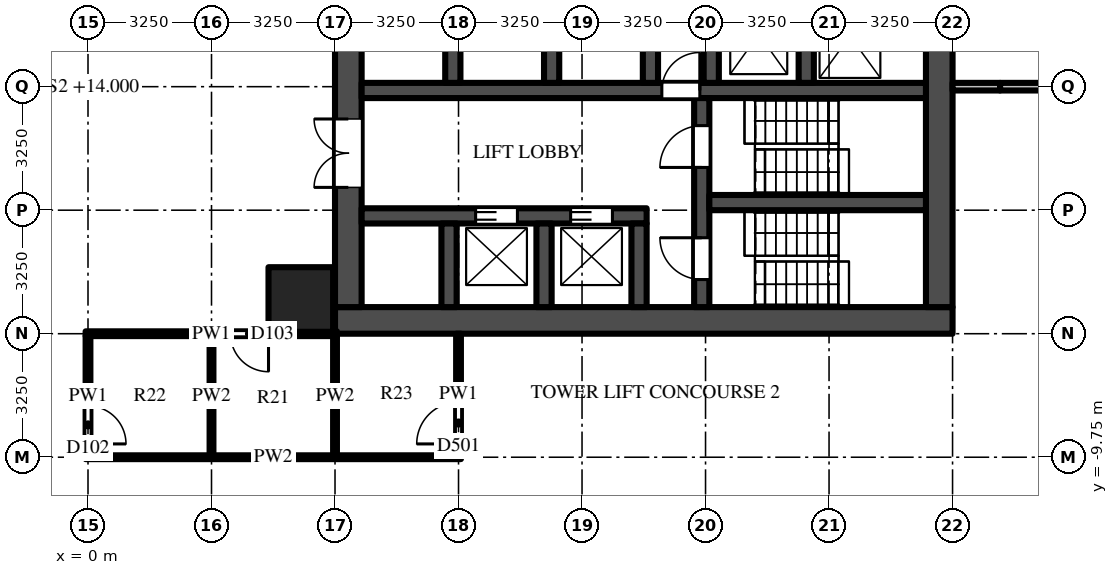
"""IFC4 building model, lengths in metres.
Left out: names, types, materials, properties, quantities, classifications, styles, units other than length and angle.
Written with IfcOpenShell. Run it as: python <this file> out.ifc"""

import sys

from ifc_helpers import new_model, si_unit, direction, frame, frame_2d, origin, origin_2d, place, context, subcontext, project, spatial, rectangle, extrude, source, transform, mapped, element, fill, save


model = new_model("IFC4")
c1 = context("Model", 3, precision=1e-05, world=origin(), true_north=direction((0.0, 1.0)))
c2 = subcontext(c1, "Body", "Model", "MODEL_VIEW")
j1 = project(units=[si_unit("LENGTHUNIT", "METRE"), si_unit("PLANEANGLEUNIT", "RADIAN")], contexts=[c1])
p1 = place(None, origin())
s1 = spatial("IfcSite", under=j1, at=p1, CompositionType="ELEMENT")
p2 = place(p1, origin())
s2 = spatial("IfcBuilding", under=s1, at=p2, CompositionType="ELEMENT")
p3 = place(p2, frame((0.0, 0.0, 14.0)))
s3 = spatial("IfcBuildingStorey", under=s2, at=p3, CompositionType="ELEMENT", Elevation=14.0)
m1 = source(origin(), c2, "Body", "SweptSolid", [
    extrude(rectangle(XDim=1.7, YDim=1.7, at=origin_2d()), origin(), (0.0, 0.0, 1.0), 5.0),
])
p4 = place(p3, frame((5.6, -5.6, 0.0), z_axis=(0.0, 0.0, 1.0), x_axis=(1.0, 0.0, 0.0)))
e1 = element("IfcColumn", 1, at=p4, inside=s3, PredefinedType="COLUMN", context=c2, shape_type="MappedRepresentation", body=[
    mapped(m1, transform((0.0, 0.0, 0.0))),
])
m2 = source(origin(), c2, "Body", "SweptSolid", [
    extrude(rectangle(XDim=16.25, YDim=0.7, at=frame_2d((8.125, 0.0))), origin(), (0.0, 0.0, 1.0), 4.7),
])
p5 = place(p3, frame((6.5, -6.15, 0.0), z_axis=(0.0, 0.0, 1.0), x_axis=(1.0, 0.0, 0.0)))
e2 = element("IfcWall", 2, at=p5, inside=s3, PredefinedType="SHEAR", context=c2, shape_type="MappedRepresentation", body=[
    mapped(m2, transform((0.0, 0.0, 0.0))),
])
m3 = source(origin(), c2, "Body", "SweptSolid", [
    extrude(rectangle(XDim=9.05, YDim=0.7, at=frame_2d((4.525, 0.0))), origin(), (0.0, 0.0, 1.0), 4.7),
])
p6 = place(p3, frame((6.85, -5.8, 0.0), z_axis=(0.0, 0.0, 1.0), x_axis=(0.0, 1.0, 0.0)))
e3 = element("IfcWall", 3, at=p6, inside=s3, PredefinedType="SHEAR", context=c2, shape_type="MappedRepresentation", body=[
    mapped(m3, transform((0.0, 0.0, 0.0))),
])
m4 = source(origin(), c2, "Body", "SweptSolid", [
    extrude(rectangle(XDim=1.8, YDim=2.1, at=frame_2d((0.9, 1.05))), frame((0.0, 0.36, 0.0), z_axis=(0.0, -1.0, 0.0), x_axis=(1.0, 0.0, 0.0)), (0.0, 0.0, 1.0), 0.72),
])
p7 = place(p6, frame((3.15, 0.0, 0.0)))
e4 = element("IfcOpeningElement", 4, at=p7, cuts=e3, PredefinedType="OPENING", context=c2, shape_type="MappedRepresentation", body=[
    mapped(m4, transform((0.0, 0.0, 0.0))),
])
p8 = place(p3, frame((22.4, -5.8, 0.0), z_axis=(0.0, 0.0, 1.0), x_axis=(0.0, 1.0, 0.0)))
e5 = element("IfcWall", 5, at=p8, inside=s3, PredefinedType="SHEAR", context=c2, shape_type="MappedRepresentation", body=[
    mapped(m3, transform((0.0, 0.0, 0.0))),
])
m5 = source(origin(), c2, "Body", "SweptSolid", [
    extrude(rectangle(XDim=7.5, YDim=0.4, at=frame_2d((3.75, 0.0))), origin(), (0.0, 0.0, 1.0), 4.7),
])
p9 = place(p3, frame((7.2, -3.4, 0.0), z_axis=(0.0, 0.0, 1.0), x_axis=(1.0, 0.0, 0.0)))
e6 = element("IfcWall", 6, at=p9, inside=s3, PredefinedType="SHEAR", context=c2, shape_type="MappedRepresentation", body=[
    mapped(m5, transform((0.0, 0.0, 0.0))),
])
m6 = source(origin(), c2, "Body", "SweptSolid", [
    extrude(rectangle(XDim=1.1, YDim=2.1, at=frame_2d((0.55, 1.05))), frame((0.0, 0.21, 0.0), z_axis=(0.0, -1.0, 0.0), x_axis=(1.0, 0.0, 0.0)), (0.0, 0.0, 1.0), 0.42),
])
p10 = place(p9, frame((3.0, 0.0, 0.0)))
e7 = element("IfcOpeningElement", 7, at=p10, cuts=e6, PredefinedType="OPENING", context=c2, shape_type="MappedRepresentation", body=[
    mapped(m6, transform((0.0, 0.0, 0.0))),
])
p11 = place(p9, frame((5.5, 0.0, 0.0)))
e8 = element("IfcOpeningElement", 8, at=p11, cuts=e6, PredefinedType="OPENING", context=c2, shape_type="MappedRepresentation", body=[
    mapped(m6, transform((0.0, 0.0, 0.0))),
])
m7 = source(origin(), c2, "Body", "SweptSolid", [
    extrude(rectangle(XDim=14.85, YDim=0.4, at=frame_2d((7.425, 0.0))), origin(), (0.0, 0.0, 1.0), 4.7),
])
p12 = place(p3, frame((7.2, -0.1, 0.0), z_axis=(0.0, 0.0, 1.0), x_axis=(1.0, 0.0, 0.0)))
e9 = element("IfcWall", 9, at=p12, inside=s3, PredefinedType="SHEAR", context=c2, shape_type="MappedRepresentation", body=[
    mapped(m7, transform((0.0, 0.0, 0.0))),
])
m8 = source(origin(), c2, "Body", "SweptSolid", [
    extrude(rectangle(XDim=1.0, YDim=2.1, at=frame_2d((0.5, 1.05))), frame((0.0, 0.21, 0.0), z_axis=(0.0, -1.0, 0.0), x_axis=(1.0, 0.0, 0.0)), (0.0, 0.0, 1.0), 0.42),
])
p13 = place(p12, frame((7.9, 0.0, 0.0)))
e10 = element("IfcOpeningElement", 10, at=p13, cuts=e9, PredefinedType="OPENING", context=c2, shape_type="MappedRepresentation", body=[
    mapped(m8, transform((0.0, 0.0, 0.0))),
])
m9 = source(origin(), c2, "Body", "SweptSolid", [
    extrude(rectangle(XDim=5.5, YDim=0.4, at=frame_2d((2.75, 0.0))), origin(), (0.0, 0.0, 1.0), 4.7),
])
p14 = place(p3, frame((16.15, -5.8, 0.0), z_axis=(0.0, 0.0, 1.0), x_axis=(0.0, 1.0, 0.0)))
e11 = element("IfcWall", 11, at=p14, inside=s3, PredefinedType="SHEAR", context=c2, shape_type="MappedRepresentation", body=[
    mapped(m9, transform((0.0, 0.0, 0.0))),
])
p15 = place(p14, frame((0.725, 0.0, 0.0)))
e12 = element("IfcOpeningElement", 12, at=p15, cuts=e11, PredefinedType="OPENING", context=c2, shape_type="MappedRepresentation", body=[
    mapped(m6, transform((0.0, 0.0, 0.0))),
])
p16 = place(p14, frame((3.675, 0.0, 0.0)))
e13 = element("IfcOpeningElement", 13, at=p16, cuts=e11, PredefinedType="OPENING", context=c2, shape_type="MappedRepresentation", body=[
    mapped(m6, transform((0.0, 0.0, 0.0))),
])
m10 = source(origin(), c2, "Body", "SweptSolid", [
    extrude(rectangle(XDim=5.7, YDim=0.4, at=frame_2d((2.85, 0.0))), origin(), (0.0, 0.0, 1.0), 4.7),
])
p17 = place(p3, frame((16.35, -3.05, 0.0), z_axis=(0.0, 0.0, 1.0), x_axis=(1.0, 0.0, 0.0)))
e14 = element("IfcWall", 14, at=p17, inside=s3, PredefinedType="SHEAR", context=c2, shape_type="MappedRepresentation", body=[
    mapped(m10, transform((0.0, 0.0, 0.0))),
])
m11 = source(origin(), c2, "Body", "SweptSolid", [
    extrude(rectangle(XDim=2.2, YDim=0.4, at=frame_2d((1.1, 0.0))), origin(), (0.0, 0.0, 1.0), 4.7),
])
for number, where, z_axis, x_axis in (
    (15, (9.5, -5.8, 0.0), (0.0, 0.0, 1.0), (0.0, 1.0, 0.0)),
    (16, (12.0, -5.8, 0.0), (0.0, 0.0, 1.0), (0.0, 1.0, 0.0)),
    (17, (14.5, -5.8, 0.0), (0.0, 0.0, 1.0), (0.0, 1.0, 0.0)),
):
    element("IfcWall", number, at=place(p3, frame(where, z_axis=z_axis, x_axis=x_axis)), inside=s3, PredefinedType="SHEAR", context=c2, shape_type="MappedRepresentation", body=[
        mapped(m11, transform((0.0, 0.0, 0.0))),
    ])
m12 = source(origin(), c2, "Body", "SweptSolid", [
    extrude(rectangle(XDim=2.45, YDim=0.4, at=frame_2d((1.225, 0.0))), origin(), (0.0, 0.0, 1.0), 4.7),
])
for number, where, z_axis, x_axis in (
    (18, (9.6, 0.1, 0.0), (0.0, 0.0, 1.0), (0.0, 1.0, 0.0)),
    (19, (12.2, 0.1, 0.0), (0.0, 0.0, 1.0), (0.0, 1.0, 0.0)),
    (20, (14.8, 0.1, 0.0), (0.0, 0.0, 1.0), (0.0, 1.0, 0.0)),
    (21, (16.4, 0.1, 0.0), (0.0, 0.0, 1.0), (0.0, 1.0, 0.0)),
    (22, (18.9, 0.1, 0.0), (0.0, 0.0, 1.0), (0.0, 1.0, 0.0)),
):
    element("IfcWall", number, at=place(p3, frame(where, z_axis=z_axis, x_axis=x_axis)), inside=s3, PredefinedType="SHEAR", context=c2, shape_type="MappedRepresentation", body=[
        mapped(m12, transform((0.0, 0.0, 0.0))),
    ])
m13 = source(origin(), c2, "Body", "SweptSolid", [
    extrude(rectangle(XDim=3.137, YDim=0.125, at=frame_2d((1.569, 0.0))), origin(), (0.0, 0.0, 1.0), 4.077),
])
p18 = place(p3, frame((0.0, -6.562, 0.0), z_axis=(0.0, 0.0, 1.0), x_axis=(0.0, -1.0, 0.0)))
e23 = element("IfcWall", 23, at=p18, inside=s3, PredefinedType="PARTITIONING", context=c2, shape_type="MappedRepresentation", body=[
    mapped(m13, transform((0.0, 0.0, 0.0))),
])
m14 = source(origin(), c2, "Body", "SweptSolid", [
    extrude(rectangle(XDim=1.0, YDim=2.1, at=frame_2d((0.5, 1.05))), frame((0.0, 0.073, 0.0), z_axis=(0.0, -1.0, 0.0), x_axis=(1.0, 0.0, 0.0)), (0.0, 0.0, 1.0), 0.145),
])
p19 = place(p18, frame((1.837, 0.0, 0.0)))
e24 = element("IfcOpeningElement", 24, at=p19, cuts=e23, PredefinedType="OPENING", context=c2, shape_type="MappedRepresentation", body=[
    mapped(m14, transform((0.0, 0.0, 0.0))),
])
m15 = source(origin(), c2, "Body", "SweptSolid", [
    extrude(rectangle(XDim=3.137, YDim=0.1, at=frame_2d((1.569, 0.0))), origin(), (0.0, 0.0, 1.0), 4.7),
])
p20 = place(p3, frame((3.25, -9.7, 0.0), z_axis=(0.0, 0.0, 1.0), x_axis=(0.0, 1.0, 0.0)))
e25 = element("IfcWall", 25, at=p20, inside=s3, PredefinedType="PARTITIONING", context=c2, shape_type="MappedRepresentation", body=[
    mapped(m15, transform((0.0, 0.0, 0.0))),
])
m16 = source(origin(), c2, "Body", "SweptSolid", [
    extrude(rectangle(XDim=3.137, YDim=0.1, at=frame_2d((1.569, 0.0))), origin(), (0.0, 0.0, 1.0), 3.996),
])
p21 = place(p3, frame((6.5, -9.7, 0.0), z_axis=(0.0, 0.0, 1.0), x_axis=(0.0, 1.0, 0.0)))
e26 = element("IfcWall", 26, at=p21, inside=s3, PredefinedType="PARTITIONING", context=c2, shape_type="MappedRepresentation", body=[
    mapped(m16, transform((0.0, 0.0, 0.0))),
])
m17 = source(origin(), c2, "Body", "SweptSolid", [
    extrude(rectangle(XDim=3.2, YDim=0.125, at=frame_2d((1.6, 0.0))), origin(), (0.0, 0.0, 1.0), 3.996),
])
p22 = place(p3, frame((9.75, -9.7, 0.0), z_axis=(0.0, 0.0, 1.0), x_axis=(0.0, 1.0, 0.0)))
e27 = element("IfcWall", 27, at=p22, inside=s3, PredefinedType="PARTITIONING", context=c2, shape_type="MappedRepresentation", body=[
    mapped(m17, transform((0.0, 0.0, 0.0))),
])
m18 = source(origin(), c2, "Body", "SweptSolid", [
    extrude(rectangle(XDim=1.1, YDim=2.1, at=frame_2d((0.55, 1.05))), frame((0.0, 0.073, 0.0), z_axis=(0.0, -1.0, 0.0), x_axis=(1.0, 0.0, 0.0)), (0.0, 0.0, 1.0), 0.145),
])
p23 = place(p22, frame((0.3, 0.0, 0.0)))
e28 = element("IfcOpeningElement", 28, at=p23, cuts=e27, PredefinedType="OPENING", context=c2, shape_type="MappedRepresentation", body=[
    mapped(m18, transform((0.0, 0.0, 0.0))),
])
m19 = source(origin(), c2, "Body", "SweptSolid", [
    extrude(rectangle(XDim=9.875, YDim=0.1, at=frame_2d((4.938, 0.0))), origin(), (0.0, 0.0, 1.0), 3.762),
])
p24 = place(p3, frame((-0.062, -9.75, 0.0), z_axis=(0.0, 0.0, 1.0), x_axis=(1.0, 0.0, 0.0)))
e29 = element("IfcWall", 29, at=p24, inside=s3, PredefinedType="PARTITIONING", context=c2, shape_type="MappedRepresentation", body=[
    mapped(m19, transform((0.0, 0.0, 0.0))),
])
m20 = source(origin(), c2, "Body", "SweptSolid", [
    extrude(rectangle(XDim=6.613, YDim=0.125, at=frame_2d((3.306, 0.0))), origin(), (0.0, 0.0, 1.0), 3.762),
])
p25 = place(p3, frame((6.55, -6.5, 0.0), z_axis=(0.0, 0.0, 1.0), x_axis=(-1.0, 0.0, 0.0)))
e30 = element("IfcWall", 30, at=p25, inside=s3, PredefinedType="PARTITIONING", context=c2, shape_type="MappedRepresentation", body=[
    mapped(m20, transform((0.0, 0.0, 0.0))),
])
p26 = place(p25, frame((1.8, 0.0, 0.0)))
e31 = element("IfcOpeningElement", 31, at=p26, cuts=e30, PredefinedType="OPENING", context=c2, shape_type="MappedRepresentation", body=[
    mapped(m14, transform((0.0, 0.0, 0.0))),
])
m21 = source(origin(), c2, "Body", "SweptSolid", [
    extrude(rectangle(XDim=1.25, YDim=0.2, at=frame_2d((0.625, 0.0))), origin(), (0.0, 0.0, 1.0), 4.077),
])
p27 = place(p3, frame((22.75, 0.0, 0.0), z_axis=(0.0, 0.0, 1.0), x_axis=(1.0, 0.0, 0.0)))
e32 = element("IfcWall", 32, at=p27, inside=s3, PredefinedType="PARTITIONING", context=c2, shape_type="MappedRepresentation", body=[
    mapped(m21, transform((0.0, 0.0, 0.0))),
])
m22 = source(origin(), c2, "Body", "SweptSolid", [
    extrude(rectangle(XDim=2.0, YDim=0.2, at=frame_2d((1.0, 0.0))), origin(), (0.0, 0.0, 1.0), 4.077),
])
p28 = place(p3, frame((26.0, 0.0, 0.0), z_axis=(0.0, 0.0, 1.0), x_axis=(-1.0, 0.0, 0.0)))
e33 = element("IfcWall", 33, at=p28, inside=s3, PredefinedType="PARTITIONING", context=c2, shape_type="MappedRepresentation", body=[
    mapped(m22, transform((0.0, 0.0, 0.0))),
])
m23 = source(origin(), c2, "Body", "SweptSolid", [
    extrude(rectangle(XDim=1.1, YDim=2.1, at=frame_2d((0.55, 1.05))), frame((0.0, 0.025, 0.0), z_axis=(0.0, -1.0, 0.0), x_axis=(1.0, 0.0, 0.0)), (0.0, 0.0, 1.0), 0.05),
])
p29 = place(p10, origin())
e34 = element("IfcDoor", 34, at=p29, inside=s3, OperationType="DOUBLE_DOOR_SLIDING", PredefinedType="DOOR", context=c2, shape_type="MappedRepresentation", body=[
    mapped(m23, transform((0.0, 0.0, 0.0))),
])
fill(e7, e34)
p30 = place(p11, origin())
e35 = element("IfcDoor", 35, at=p30, inside=s3, OperationType="DOUBLE_DOOR_SLIDING", PredefinedType="DOOR", context=c2, shape_type="MappedRepresentation", body=[
    mapped(m23, transform((0.0, 0.0, 0.0))),
])
fill(e8, e35)
m24 = source(origin(), c2, "Body", "SweptSolid", [
    extrude(rectangle(XDim=1.8, YDim=2.1, at=frame_2d((0.9, 1.05))), frame((0.0, -0.275, 0.0), z_axis=(0.0, -1.0, 0.0), x_axis=(1.0, 0.0, 0.0)), (0.0, 0.0, 1.0), 0.05),
])
p31 = place(p7, origin())
e36 = element("IfcDoor", 36, at=p31, inside=s3, OperationType="DOUBLE_DOOR_SINGLE_SWING", PredefinedType="DOOR", context=c2, shape_type="MappedRepresentation", body=[
    mapped(m24, transform((0.0, 0.0, 0.0))),
])
fill(e4, e36)
p32 = place(p15, origin())
e37 = element("IfcDoor", 37, at=p32, inside=s3, OperationType="SINGLE_SWING_RIGHT", PredefinedType="DOOR", context=c2, shape_type="MappedRepresentation", body=[
    mapped(m23, transform((0.0, 0.0, 0.0))),
])
fill(e12, e37)
p33 = place(p16, origin())
e38 = element("IfcDoor", 38, at=p33, inside=s3, OperationType="SINGLE_SWING_LEFT", PredefinedType="DOOR", context=c2, shape_type="MappedRepresentation", body=[
    mapped(m23, transform((0.0, 0.0, 0.0))),
])
fill(e13, e38)
m25 = source(origin(), c2, "Body", "SweptSolid", [
    extrude(rectangle(XDim=1.0, YDim=2.1, at=frame_2d((0.5, 1.05))), frame((0.0, 0.025, 0.0), z_axis=(0.0, -1.0, 0.0), x_axis=(1.0, 0.0, 0.0)), (0.0, 0.0, 1.0), 0.05),
])
p34 = place(p13, origin())
e39 = element("IfcDoor", 39, at=p34, inside=s3, OperationType="SINGLE_SWING_RIGHT", PredefinedType="DOOR", context=c2, shape_type="MappedRepresentation", body=[
    mapped(m25, transform((0.0, 0.0, 0.0))),
])
fill(e10, e39)
p35 = place(p19, origin())
e40 = element("IfcDoor", 40, at=p35, inside=s3, OperationType="SINGLE_SWING_RIGHT", PredefinedType="DOOR", context=c2, shape_type="MappedRepresentation", body=[
    mapped(m25, transform((0.0, 0.0, 0.0))),
])
fill(e24, e40)
p36 = place(p23, origin())
e41 = element("IfcDoor", 41, at=p36, inside=s3, OperationType="SINGLE_SWING_LEFT", PredefinedType="DOOR", context=c2, shape_type="MappedRepresentation", body=[
    mapped(m23, transform((0.0, 0.0, 0.0))),
])
fill(e28, e41)
p37 = place(p26, origin())
e42 = element("IfcDoor", 42, at=p37, inside=s3, OperationType="SINGLE_SWING_LEFT", PredefinedType="DOOR", context=c2, shape_type="MappedRepresentation", body=[
    mapped(m25, transform((0.0, 0.0, 0.0))),
])
fill(e31, e42)
save(model, sys.argv[1])
